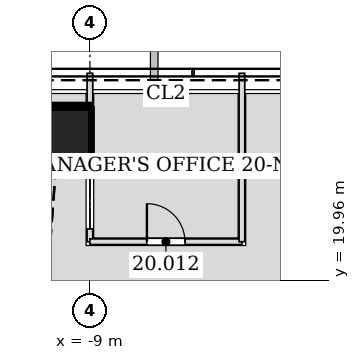
"""IFC4 building model, lengths in metres.
Left out: names, types, materials, properties, quantities, classifications, styles, units other than length and angle.
Written with IfcOpenShell. Run it as: python <this file> out.ifc"""

import sys

from ifc_helpers import new_model, si_unit, direction, frame, frame_2d, origin, origin_2d, place, context, subcontext, project, spatial, rectangle, hollow_rectangle, extrude, element, fill, save


model = new_model("IFC4")
c1 = context("Model", 3, precision=1e-05, world=origin(), true_north=direction((0.0, 1.0)))
c2 = subcontext(c1, "Body", "Model", "MODEL_VIEW")
j1 = project(units=[si_unit("LENGTHUNIT", "METRE"), si_unit("PLANEANGLEUNIT", "RADIAN")], contexts=[c1])
p1 = place(None, origin())
s1 = spatial("IfcSite", under=j1, at=p1, CompositionType="ELEMENT")
p2 = place(p1, origin())
s2 = spatial("IfcBuilding", under=s1, at=p2, CompositionType="ELEMENT")
p3 = place(p2, frame((0.0, 0.0, 91.8)))
s3 = spatial("IfcBuildingStorey", under=s2, at=p3, CompositionType="ELEMENT", Elevation=91.8)
p4 = place(p3, frame((-9.833, 23.74, 0.0), z_axis=(0.01173664659, -0.028237674468, 0.999532333078), x_axis=(0.923413851312, 0.38380575713, 0.0)))
e1 = element("IfcColumn", 1, at=p4, inside=s3, PredefinedType="COLUMN", context=c2, shape_type="SweptSolid", body=[
    extrude(hollow_rectangle(XDim=1.7, YDim=1.7, WallThickness=0.08, at=origin_2d()), origin(), (0.0, 0.0, 1.0), 4.202),
])
p5 = place(p3, frame((-9.0, 25.4, 0.0), z_axis=(0.0, 0.0, 1.0), x_axis=(0.0, -1.0, 0.0)))
e2 = element("IfcWall", 2, at=p5, inside=s3, PredefinedType="PARTITIONING", context=c2, shape_type="SweptSolid", body=[
    extrude(rectangle(XDim=1.401, YDim=0.15, at=frame_2d((0.701, 0.0))), origin(), (0.0, 0.0, 1.0), 4.035),
])
p6 = place(p3, frame((-9.0, 23.004, 0.0), z_axis=(0.0, 0.0, 1.0), x_axis=(0.0, -1.0, 0.0)))
e3 = element("IfcWall", 3, at=p6, inside=s3, PredefinedType="PARTITIONING", context=c2, shape_type="SweptSolid", body=[
    extrude(rectangle(XDim=2.037, YDim=0.15, at=frame_2d((1.018, 0.0))), origin(), (0.0, 0.0, 1.0), 3.423),
])
p7 = place(p3, frame((-9.0, 20.968, 0.0), z_axis=(0.0, 0.0, 1.0), x_axis=(1.0, 0.0, 0.0)))
e4 = element("IfcWall", 4, at=p7, inside=s3, PredefinedType="PARTITIONING", context=c2, shape_type="SweptSolid", body=[
    extrude(rectangle(XDim=4.0, YDim=0.15, at=frame_2d((2.0, 0.0))), origin(), (0.0, 0.0, 1.0), 4.035),
])
p8 = place(p7, frame((1.5, 0.0, 0.0)))
e5 = element("IfcOpeningElement", 5, at=p8, cuts=e4, PredefinedType="OPENING", context=c2, shape_type="SweptSolid", body=[
    extrude(rectangle(XDim=1.0, YDim=2.1, at=frame_2d((0.5, 1.05))), frame((0.0, 0.085, 0.0), z_axis=(0.0, -1.0, 0.0), x_axis=(1.0, 0.0, 0.0)), (0.0, 0.0, 1.0), 0.17),
])
p9 = place(p3, frame((-5.0, 20.968, 0.0), z_axis=(0.0, 0.0, 1.0), x_axis=(0.0, 1.0, 0.0)))
e6 = element("IfcWall", 6, at=p9, inside=s3, PredefinedType="PARTITIONING", context=c2, shape_type="SweptSolid", body=[
    extrude(rectangle(XDim=4.432, YDim=0.15, at=frame_2d((2.216, 0.0))), origin(), (0.0, 0.0, 1.0), 3.423),
])
p10 = place(p8, origin())
e7 = element("IfcDoor", 7, at=p10, inside=s3, OperationType="SINGLE_SWING_LEFT", PredefinedType="DOOR", context=c2, shape_type="SweptSolid", body=[
    extrude(rectangle(XDim=1.0, YDim=2.1, at=frame_2d((0.5, 1.05))), frame((0.0, 0.025, 0.0), z_axis=(0.0, -1.0, 0.0), x_axis=(1.0, 0.0, 0.0)), (0.0, 0.0, 1.0), 0.05),
])
fill(e5, e7)
save(model, sys.argv[1])
